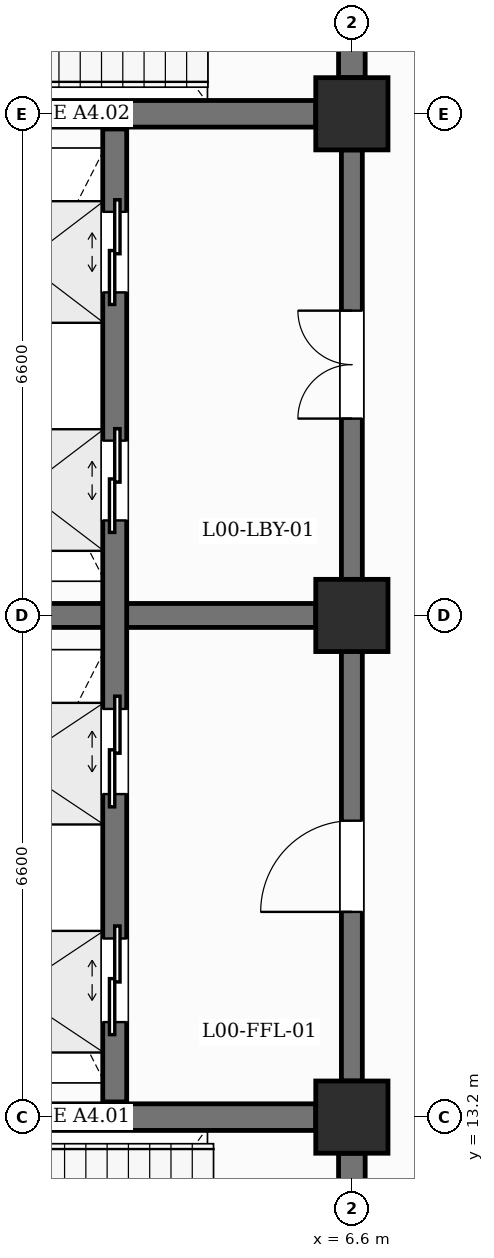
"""IFC4 building model, lengths in metres.
Left out: names, types, materials, properties, quantities, classifications, styles, units other than length and angle.
Written with IfcOpenShell. Run it as: python <this file> out.ifc"""

import sys

from ifc_helpers import new_model, si_unit, direction, frame, frame_2d, origin, origin_2d, place, context, subcontext, project, spatial, rectangle, extrude, element, fill, save


model = new_model("IFC4")
c1 = context("Model", 3, precision=1e-05, world=origin(), true_north=direction((0.0, 1.0)))
c2 = subcontext(c1, "Body", "Model", "MODEL_VIEW")
j1 = project(units=[si_unit("LENGTHUNIT", "METRE"), si_unit("PLANEANGLEUNIT", "RADIAN")], contexts=[c1])
p1 = place(None, origin())
s1 = spatial("IfcSite", under=j1, at=p1, CompositionType="ELEMENT")
p2 = place(p1, origin())
s2 = spatial("IfcBuilding", under=s1, at=p2, CompositionType="ELEMENT")
p3 = place(p2, origin())
s3 = spatial("IfcBuildingStorey", under=s2, at=p3, CompositionType="ELEMENT", Elevation=0.0)
for number, where, z_axis, x_axis in (
    (1, (6.6, 13.2, 0.0), (0.0, 0.0, 1.0), (1.0, 0.0, 0.0)),
    (2, (6.6, 19.8, 0.0), (0.0, 0.0, 1.0), (1.0, 0.0, 0.0)),
    (3, (6.6, 26.4, 0.0), (0.0, 0.0, 1.0), (1.0, 0.0, 0.0)),
):
    element("IfcColumn", number, at=place(p3, frame(where, z_axis=z_axis, x_axis=x_axis)), inside=s3, PredefinedType="COLUMN", context=c2, shape_type="SweptSolid", body=[
        extrude(rectangle(XDim=0.95, YDim=0.95, at=origin_2d()), origin(), (0.0, 0.0, 1.0), 5.4),
    ])
p4 = place(p3, frame((0.475, 13.2, 0.0), z_axis=(0.0, 0.0, 1.0), x_axis=(1.0, 0.0, 0.0)))
e4 = element("IfcWall", 4, at=p4, inside=s3, PredefinedType="SHEAR", context=c2, shape_type="SweptSolid", body=[
    extrude(rectangle(XDim=5.65, YDim=0.35, at=frame_2d((2.825, 0.0))), origin(), (0.0, 0.0, 1.0), 4.2),
])
p5 = place(p3, frame((6.6, 7.075, 0.0), z_axis=(0.0, 0.0, 1.0), x_axis=(0.0, 1.0, 0.0)))
e5 = element("IfcWall", 5, at=p5, inside=s3, PredefinedType="SHEAR", context=c2, shape_type="SweptSolid", body=[
    extrude(rectangle(XDim=5.65, YDim=0.35, at=frame_2d((2.825, 0.0))), origin(), (0.0, 0.0, 1.0), 4.3),
])
p6 = place(p5, frame((2.25, 0.0, 0.0)))
e6 = element("IfcOpeningElement", 6, at=p6, cuts=e5, PredefinedType="OPENING", context=c2, shape_type="SweptSolid", body=[
    extrude(rectangle(XDim=1.15, YDim=2.2, at=frame_2d((0.575, 1.1))), frame((0.0, 0.185, 0.0), z_axis=(0.0, -1.0, 0.0), x_axis=(1.0, 0.0, 0.0)), (0.0, 0.0, 1.0), 0.37),
])
p7 = place(p3, frame((0.475, 26.4, 0.0), z_axis=(0.0, 0.0, 1.0), x_axis=(1.0, 0.0, 0.0)))
e7 = element("IfcWall", 7, at=p7, inside=s3, PredefinedType="SHEAR", context=c2, shape_type="SweptSolid", body=[
    extrude(rectangle(XDim=5.65, YDim=0.35, at=frame_2d((2.825, 0.0))), origin(), (0.0, 0.0, 1.0), 4.2),
])
p8 = place(p3, frame((6.6, 26.875, 0.0), z_axis=(0.0, 0.0, 1.0), x_axis=(0.0, 1.0, 0.0)))
e8 = element("IfcWall", 8, at=p8, inside=s3, PredefinedType="SHEAR", context=c2, shape_type="SweptSolid", body=[
    extrude(rectangle(XDim=5.65, YDim=0.35, at=frame_2d((2.825, 0.0))), origin(), (0.0, 0.0, 1.0), 4.3),
])
p9 = place(p8, frame((2.25, 0.0, 0.0)))
e9 = element("IfcOpeningElement", 9, at=p9, cuts=e8, PredefinedType="OPENING", context=c2, shape_type="SweptSolid", body=[
    extrude(rectangle(XDim=1.15, YDim=2.2, at=frame_2d((0.575, 1.1))), frame((0.0, 0.185, 0.0), z_axis=(0.0, -1.0, 0.0), x_axis=(1.0, 0.0, 0.0)), (0.0, 0.0, 1.0), 0.37),
])
p10 = place(p3, frame((0.475, 19.8, 0.0), z_axis=(0.0, 0.0, 1.0), x_axis=(1.0, 0.0, 0.0)))
e10 = element("IfcWall", 10, at=p10, inside=s3, PredefinedType="SHEAR", context=c2, shape_type="SweptSolid", body=[
    extrude(rectangle(XDim=5.65, YDim=0.315, at=frame_2d((2.825, 0.0))), origin(), (0.0, 0.0, 1.0), 4.3),
])
p11 = place(p3, frame((6.6, 13.675, 0.0), z_axis=(0.0, 0.0, 1.0), x_axis=(0.0, 1.0, 0.0)))
e11 = element("IfcWall", 11, at=p11, inside=s3, PredefinedType="SHEAR", context=c2, shape_type="SweptSolid", body=[
    extrude(rectangle(XDim=5.65, YDim=0.275, at=frame_2d((2.825, 0.0))), origin(), (0.0, 0.0, 1.0), 4.3),
])
p12 = place(p11, frame((2.225, 0.0, 0.0)))
e12 = element("IfcOpeningElement", 12, at=p12, cuts=e11, PredefinedType="OPENING", context=c2, shape_type="SweptSolid", body=[
    extrude(rectangle(XDim=1.2, YDim=2.25, at=frame_2d((0.6, 1.125))), frame((0.0, 0.147, 0.0), z_axis=(0.0, -1.0, 0.0), x_axis=(1.0, 0.0, 0.0)), (0.0, 0.0, 1.0), 0.295),
])
p13 = place(p3, frame((6.6, 20.275, 0.0), z_axis=(0.0, 0.0, 1.0), x_axis=(0.0, 1.0, 0.0)))
e13 = element("IfcWall", 13, at=p13, inside=s3, PredefinedType="SHEAR", context=c2, shape_type="SweptSolid", body=[
    extrude(rectangle(XDim=5.65, YDim=0.275, at=frame_2d((2.825, 0.0))), origin(), (0.0, 0.0, 1.0), 4.3),
])
p14 = place(p13, frame((2.115, 0.0, 0.0)))
e14 = element("IfcOpeningElement", 14, at=p14, cuts=e13, PredefinedType="OPENING", context=c2, shape_type="SweptSolid", body=[
    extrude(rectangle(XDim=1.42, YDim=2.2, at=frame_2d((0.71, 1.1))), frame((0.0, 0.147, 0.0), z_axis=(0.0, -1.0, 0.0), x_axis=(1.0, 0.0, 0.0)), (0.0, 0.0, 1.0), 0.295),
])
p15 = place(p3, frame((3.48, 13.4, 0.0), z_axis=(0.0, 0.0, 1.0), x_axis=(0.0, 1.0, 0.0)))
e15 = element("IfcWall", 15, at=p15, inside=s3, PredefinedType="SHEAR", context=c2, shape_type="SweptSolid", body=[
    extrude(rectangle(XDim=6.2, YDim=0.315, at=frame_2d((3.1, 0.0))), origin(), (0.0, 0.0, 1.0), 5.05),
])
p16 = place(p15, frame((1.05, 0.0, 0.0)))
e16 = element("IfcOpeningElement", 16, at=p16, cuts=e15, PredefinedType="OPENING", context=c2, shape_type="SweptSolid", body=[
    extrude(rectangle(XDim=1.1, YDim=2.15, at=frame_2d((0.55, 1.075))), frame((0.0, 0.167, 0.0), z_axis=(0.0, -1.0, 0.0), x_axis=(1.0, 0.0, 0.0)), (0.0, 0.0, 1.0), 0.335),
])
p17 = place(p15, frame((4.05, 0.0, 0.0)))
e17 = element("IfcOpeningElement", 17, at=p17, cuts=e15, PredefinedType="OPENING", context=c2, shape_type="SweptSolid", body=[
    extrude(rectangle(XDim=1.12, YDim=2.15, at=frame_2d((0.56, 1.075))), frame((0.0, 0.167, 0.0), z_axis=(0.0, -1.0, 0.0), x_axis=(1.0, 0.0, 0.0)), (0.0, 0.0, 1.0), 0.335),
])
p18 = place(p3, frame((3.48, 20.0, 0.0), z_axis=(0.0, 0.0, 1.0), x_axis=(0.0, 1.0, 0.0)))
e18 = element("IfcWall", 18, at=p18, inside=s3, PredefinedType="SHEAR", context=c2, shape_type="SweptSolid", body=[
    extrude(rectangle(XDim=6.2, YDim=0.315, at=frame_2d((3.1, 0.0))), origin(), (0.0, 0.0, 1.0), 5.05),
])
p19 = place(p18, frame((1.05, 0.0, 0.0)))
e19 = element("IfcOpeningElement", 19, at=p19, cuts=e18, PredefinedType="OPENING", context=c2, shape_type="SweptSolid", body=[
    extrude(rectangle(XDim=1.05, YDim=2.15, at=frame_2d((0.525, 1.075))), frame((0.0, 0.167, 0.0), z_axis=(0.0, -1.0, 0.0), x_axis=(1.0, 0.0, 0.0)), (0.0, 0.0, 1.0), 0.335),
])
p20 = place(p18, frame((4.05, 0.0, 0.0)))
e20 = element("IfcOpeningElement", 20, at=p20, cuts=e18, PredefinedType="OPENING", context=c2, shape_type="SweptSolid", body=[
    extrude(rectangle(XDim=1.06, YDim=2.15, at=frame_2d((0.53, 1.075))), frame((0.0, 0.167, 0.0), z_axis=(0.0, -1.0, 0.0), x_axis=(1.0, 0.0, 0.0)), (0.0, 0.0, 1.0), 0.335),
])
p21 = place(p16, origin())
e21 = element("IfcDoor", 21, at=p21, inside=s3, OperationType="DOUBLE_DOOR_SLIDING", PredefinedType="USERDEFINED", context=c2, shape_type="SweptSolid", body=[
    extrude(rectangle(XDim=1.1, YDim=2.15, at=frame_2d((0.55, 1.075))), frame((0.0, 0.025, 0.0), z_axis=(0.0, -1.0, 0.0), x_axis=(1.0, 0.0, 0.0)), (0.0, 0.0, 1.0), 0.05),
])
fill(e16, e21)
p22 = place(p17, origin())
e22 = element("IfcDoor", 22, at=p22, inside=s3, OperationType="DOUBLE_DOOR_SLIDING", PredefinedType="USERDEFINED", context=c2, shape_type="SweptSolid", body=[
    extrude(rectangle(XDim=1.12, YDim=2.15, at=frame_2d((0.56, 1.075))), frame((0.0, 0.025, 0.0), z_axis=(0.0, -1.0, 0.0), x_axis=(1.0, 0.0, 0.0)), (0.0, 0.0, 1.0), 0.05),
])
fill(e17, e22)
p23 = place(p19, origin())
e23 = element("IfcDoor", 23, at=p23, inside=s3, OperationType="DOUBLE_DOOR_SLIDING", PredefinedType="USERDEFINED", context=c2, shape_type="SweptSolid", body=[
    extrude(rectangle(XDim=1.05, YDim=2.15, at=frame_2d((0.525, 1.075))), frame((0.0, 0.025, 0.0), z_axis=(0.0, -1.0, 0.0), x_axis=(1.0, 0.0, 0.0)), (0.0, 0.0, 1.0), 0.05),
])
fill(e19, e23)
p24 = place(p20, origin())
e24 = element("IfcDoor", 24, at=p24, inside=s3, OperationType="DOUBLE_DOOR_SLIDING", PredefinedType="USERDEFINED", context=c2, shape_type="SweptSolid", body=[
    extrude(rectangle(XDim=1.06, YDim=2.15, at=frame_2d((0.53, 1.075))), frame((0.0, 0.025, 0.0), z_axis=(0.0, -1.0, 0.0), x_axis=(1.0, 0.0, 0.0)), (0.0, 0.0, 1.0), 0.05),
])
fill(e20, e24)
p25 = place(p12, origin())
e25 = element("IfcDoor", 25, at=p25, inside=s3, OperationType="SINGLE_SWING_LEFT", PredefinedType="DOOR", context=c2, shape_type="SweptSolid", body=[
    extrude(rectangle(XDim=1.2, YDim=2.25, at=frame_2d((0.6, 1.125))), frame((0.0, 0.025, 0.0), z_axis=(0.0, -1.0, 0.0), x_axis=(1.0, 0.0, 0.0)), (0.0, 0.0, 1.0), 0.05),
])
fill(e12, e25)
p26 = place(p14, origin())
e26 = element("IfcDoor", 26, at=p26, inside=s3, OperationType="DOUBLE_DOOR_SINGLE_SWING", PredefinedType="DOOR", context=c2, shape_type="SweptSolid", body=[
    extrude(rectangle(XDim=1.42, YDim=2.2, at=frame_2d((0.71, 1.1))), frame((0.0, 0.025, 0.0), z_axis=(0.0, -1.0, 0.0), x_axis=(1.0, 0.0, 0.0)), (0.0, 0.0, 1.0), 0.05),
])
fill(e14, e26)
save(model, sys.argv[1])
